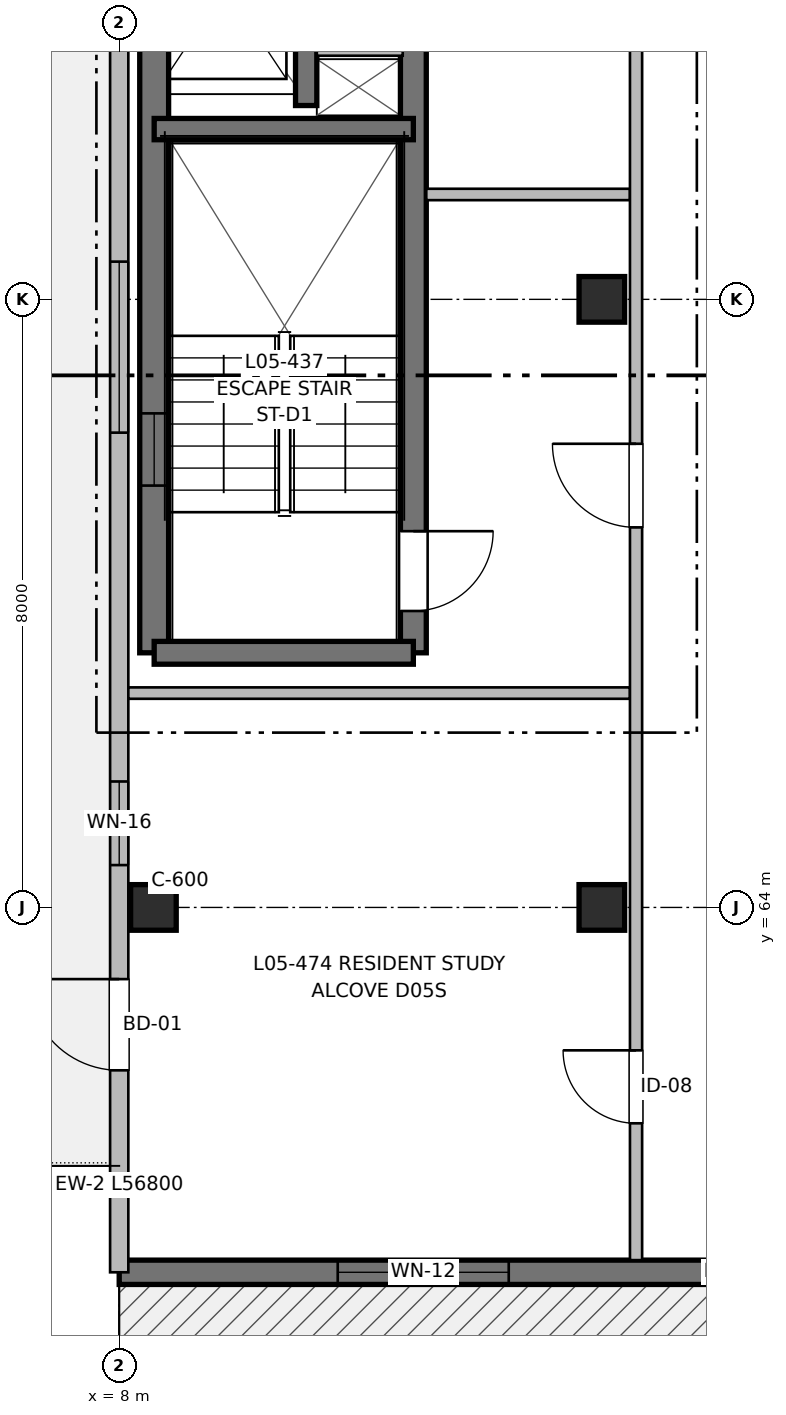
"""IFC4 building model, lengths in metres.
Left out: names, types, materials, properties, quantities, classifications, styles, units other than length and angle.
Written with IfcOpenShell. Run it as: python <this file> out.ifc"""

import sys

from ifc_helpers import new_model, si_unit, direction, frame, frame_2d, origin, origin_2d, place, context, subcontext, project, spatial, rectangle, extrude, element, fill, save


model = new_model("IFC4")
c1 = context("Model", 3, precision=1e-05, world=origin(), true_north=direction((0.0, 1.0)))
c2 = subcontext(c1, "Body", "Model", "MODEL_VIEW")
j1 = project(units=[si_unit("LENGTHUNIT", "METRE"), si_unit("PLANEANGLEUNIT", "RADIAN")], contexts=[c1])
p1 = place(None, origin())
s1 = spatial("IfcSite", under=j1, at=p1, CompositionType="ELEMENT")
p2 = place(p1, origin())
s2 = spatial("IfcBuilding", under=s1, at=p2, CompositionType="ELEMENT")
p3 = place(p2, frame((0.0, 0.0, 16.96)))
s3 = spatial("IfcBuildingStorey", under=s2, at=p3, CompositionType="ELEMENT", Elevation=16.96)
for number, where, z_axis, x_axis in (
    (1, (8.45, 64.0, 0.0), (0.0, 0.0, 1.0), (1.0, 0.0, 0.0)),
    (2, (14.35, 64.0, 0.0), (0.0, 0.0, 1.0), (1.0, 0.0, 0.0)),
    (3, (14.35, 72.0, 0.0), (0.0, 0.0, 1.0), (1.0, 0.0, 0.0)),
):
    element("IfcColumn", number, at=place(p3, frame(where, z_axis=z_axis, x_axis=x_axis)), inside=s3, PredefinedType="COLUMN", context=c2, shape_type="SweptSolid", body=[
        extrude(rectangle(XDim=0.6, YDim=0.6, at=origin_2d()), origin(), (0.0, 0.0, 1.0), 3.2),
    ])
p4 = place(p3, frame((8.46, 67.35, 0.0), z_axis=(0.0, 0.0, 1.0), x_axis=(0.0, 1.0, 0.0)))
e4 = element("IfcWall", 4, at=p4, inside=s3, PredefinedType="SHEAR", context=c2, shape_type="SweptSolid", body=[
    extrude(rectangle(XDim=12.45, YDim=0.38, at=frame_2d((6.225, 0.0))), origin(), (0.0, 0.0, 1.0), 3.2),
])
p5 = place(p4, frame((2.2, 0.0, 0.97)))
e5 = element("IfcOpeningElement", 5, at=p5, cuts=e4, PredefinedType="OPENING", context=c2, shape_type="SweptSolid", body=[
    extrude(rectangle(XDim=0.95, YDim=1.25, at=frame_2d((0.475, 0.625))), frame((0.0, 0.2, 0.0), z_axis=(0.0, -1.0, 0.0), x_axis=(1.0, 0.0, 0.0)), (0.0, 0.0, 1.0), 0.4),
])
p6 = place(p3, frame((11.87, 79.8, 0.0), z_axis=(0.0, 0.0, 1.0), x_axis=(0.0, -1.0, 0.0)))
e6 = element("IfcWall", 6, at=p6, inside=s3, PredefinedType="SHEAR", context=c2, shape_type="SweptSolid", body=[
    extrude(rectangle(XDim=12.45, YDim=0.34, at=frame_2d((6.225, 0.0))), origin(), (0.0, 0.0, 1.0), 3.2),
])
p7 = place(p6, frame((10.85, 0.0, 0.0)))
e7 = element("IfcOpeningElement", 7, at=p7, cuts=e6, PredefinedType="OPENING", context=c2, shape_type="SweptSolid", body=[
    extrude(rectangle(XDim=1.05, YDim=2.15, at=frame_2d((0.525, 1.075))), frame((0.0, 0.18, 0.0), z_axis=(0.0, -1.0, 0.0), x_axis=(1.0, 0.0, 0.0)), (0.0, 0.0, 1.0), 0.36),
])
p8 = place(p3, frame((11.87, 67.35, 0.0), z_axis=(0.0, 0.0, 1.0), x_axis=(-1.0, 0.0, 0.0)))
e8 = element("IfcWall", 8, at=p8, inside=s3, PredefinedType="SHEAR", context=c2, shape_type="SweptSolid", body=[
    extrude(rectangle(XDim=3.41, YDim=0.3, at=frame_2d((1.705, 0.0))), origin(), (0.0, 0.0, 1.0), 3.2),
])
p9 = place(p3, frame((8.46, 74.24, 0.0), z_axis=(0.0, 0.0, 1.0), x_axis=(1.0, 0.0, 0.0)))
e9 = element("IfcWall", 9, at=p9, inside=s3, PredefinedType="SHEAR", context=c2, shape_type="SweptSolid", body=[
    extrude(rectangle(XDim=3.41, YDim=0.28, at=frame_2d((1.705, 0.0))), origin(), (0.0, 0.0, 1.0), 3.2),
])
p10 = place(p3, frame((10.46, 74.55, 0.0), z_axis=(0.0, 0.0, 1.0), x_axis=(0.0, 1.0, 0.0)))
e10 = element("IfcWall", 10, at=p10, inside=s3, PredefinedType="SHEAR", context=c2, shape_type="SweptSolid", body=[
    extrude(rectangle(XDim=5.25, YDim=0.28, at=frame_2d((2.625, 0.0))), origin(), (0.0, 0.0, 1.0), 3.2),
])
p11 = place(p10, frame((1.15, 0.0, 0.0)))
e11 = element("IfcOpeningElement", 11, at=p11, cuts=e10, PredefinedType="OPENING", context=c2, shape_type="SweptSolid", body=[
    extrude(rectangle(XDim=1.0, YDim=2.15, at=frame_2d((0.5, 1.075))), frame((0.0, 0.15, 0.0), z_axis=(0.0, -1.0, 0.0), x_axis=(1.0, 0.0, 0.0)), (0.0, 0.0, 1.0), 0.3),
])
p12 = place(p10, frame((3.85, 0.0, 0.0)))
e12 = element("IfcOpeningElement", 12, at=p12, cuts=e10, PredefinedType="OPENING", context=c2, shape_type="SweptSolid", body=[
    extrude(rectangle(XDim=0.9, YDim=2.15, at=frame_2d((0.45, 1.075))), frame((0.0, 0.15, 0.0), z_axis=(0.0, -1.0, 0.0), x_axis=(1.0, 0.0, 0.0)), (0.0, 0.0, 1.0), 0.3),
])
p13 = place(p3, frame((10.6, 75.28, 0.0), z_axis=(0.0, 0.0, 1.0), x_axis=(1.0, 0.0, 0.0)))
e13 = element("IfcWall", 13, at=p13, inside=s3, PredefinedType="PARTITIONING", context=c2, shape_type="SweptSolid", body=[
    extrude(rectangle(XDim=1.13, YDim=0.15, at=frame_2d((0.565, 0.0))), origin(), (0.0, 0.0, 1.0), 2.95),
])
p14 = place(p3, frame((24.0, 59.2, 0.0), z_axis=(0.0, 0.0, 1.0), x_axis=(-1.0, 0.0, 0.0)))
e14 = element("IfcWall", 14, at=p14, inside=s3, PredefinedType="SHEAR", context=c2, shape_type="SweptSolid", body=[
    extrude(rectangle(XDim=16.0, YDim=0.32, at=frame_2d((8.0, 0.0))), origin(), (0.0, 0.0, 1.0), 2.98),
])
p15 = place(p14, frame((2.55, 0.0, 0.0)))
e15 = element("IfcOpeningElement", 15, at=p15, cuts=e14, PredefinedType="OPENING", context=c2, shape_type="SweptSolid", body=[
    extrude(rectangle(XDim=1.35, YDim=2.2, at=frame_2d((0.675, 1.1))), frame((0.0, 0.17, 0.0), z_axis=(0.0, -1.0, 0.0), x_axis=(1.0, 0.0, 0.0)), (0.0, 0.0, 1.0), 0.34),
])
p16 = place(p14, frame((10.875, 0.0, 0.72)))
e16 = element("IfcOpeningElement", 16, at=p16, cuts=e14, PredefinedType="OPENING", context=c2, shape_type="SweptSolid", body=[
    extrude(rectangle(XDim=2.25, YDim=1.5, at=frame_2d((1.125, 0.75))), frame((0.0, 0.17, 0.0), z_axis=(0.0, -1.0, 0.0), x_axis=(1.0, 0.0, 0.0)), (0.0, 0.0, 1.0), 0.34),
])
p17 = place(p3, frame((8.0, 59.2, 0.0), z_axis=(0.0, 0.0, 1.0), x_axis=(0.0, 1.0, 0.0)))
e17 = element("IfcWall", 17, at=p17, inside=s3, PredefinedType="SOLIDWALL", context=c2, shape_type="SweptSolid", body=[
    extrude(rectangle(XDim=56.8, YDim=0.24, at=frame_2d((28.4, 0.0))), origin(), (0.0, 0.0, 1.0), 2.98),
])
p18 = place(p17, frame((2.657, 0.0, 0.0)))
e18 = element("IfcOpeningElement", 18, at=p18, cuts=e17, PredefinedType="OPENING", context=c2, shape_type="SweptSolid", body=[
    extrude(rectangle(XDim=1.2, YDim=2.2, at=frame_2d((0.6, 1.1))), frame((0.0, 0.13, 0.0), z_axis=(0.0, -1.0, 0.0), x_axis=(1.0, 0.0, 0.0)), (0.0, 0.0, 1.0), 0.26),
])
p19 = place(p17, frame((5.357, 0.0, 0.62)))
e19 = element("IfcOpeningElement", 19, at=p19, cuts=e17, PredefinedType="OPENING", context=c2, shape_type="SweptSolid", body=[
    extrude(rectangle(XDim=1.1, YDim=1.6, at=frame_2d((0.55, 0.8))), frame((0.0, 0.13, 0.0), z_axis=(0.0, -1.0, 0.0), x_axis=(1.0, 0.0, 0.0)), (0.0, 0.0, 1.0), 0.26),
])
p20 = place(p17, frame((11.046, 0.0, 0.72)))
e20 = element("IfcOpeningElement", 20, at=p20, cuts=e17, PredefinedType="OPENING", context=c2, shape_type="SweptSolid", body=[
    extrude(rectangle(XDim=2.25, YDim=1.5, at=frame_2d((1.125, 0.75))), frame((0.0, 0.13, 0.0), z_axis=(0.0, -1.0, 0.0), x_axis=(1.0, 0.0, 0.0)), (0.0, 0.0, 1.0), 0.26),
])
p21 = place(p17, frame((19.311, 0.0, 0.9)))
e21 = element("IfcOpeningElement", 21, at=p21, cuts=e17, PredefinedType="OPENING", context=c2, shape_type="SweptSolid", body=[
    extrude(rectangle(XDim=1.05, YDim=1.15, at=frame_2d((0.525, 0.575))), frame((0.0, 0.13, 0.0), z_axis=(0.0, -1.0, 0.0), x_axis=(1.0, 0.0, 0.0)), (0.0, 0.0, 1.0), 0.26),
])
p22 = place(p17, frame((27.8, 0.0, 0.9)))
e22 = element("IfcOpeningElement", 22, at=p22, cuts=e17, PredefinedType="OPENING", context=c2, shape_type="SweptSolid", body=[
    extrude(rectangle(XDim=1.2, YDim=1.05, at=frame_2d((0.6, 0.525))), frame((0.0, 0.13, 0.0), z_axis=(0.0, -1.0, 0.0), x_axis=(1.0, 0.0, 0.0)), (0.0, 0.0, 1.0), 0.26),
])
p23 = place(p17, frame((36.189, 0.0, 0.9)))
e23 = element("IfcOpeningElement", 23, at=p23, cuts=e17, PredefinedType="OPENING", context=c2, shape_type="SweptSolid", body=[
    extrude(rectangle(XDim=0.65, YDim=0.95, at=frame_2d((0.325, 0.475))), frame((0.0, 0.13, 0.0), z_axis=(0.0, -1.0, 0.0), x_axis=(1.0, 0.0, 0.0)), (0.0, 0.0, 1.0), 0.26),
])
p24 = place(p17, frame((43.629, 0.0, 0.62)))
e24 = element("IfcOpeningElement", 24, at=p24, cuts=e17, PredefinedType="OPENING", context=c2, shape_type="SweptSolid", body=[
    extrude(rectangle(XDim=1.1, YDim=1.6, at=frame_2d((0.55, 0.8))), frame((0.0, 0.13, 0.0), z_axis=(0.0, -1.0, 0.0), x_axis=(1.0, 0.0, 0.0)), (0.0, 0.0, 1.0), 0.26),
])
p25 = place(p17, frame((52.693, 0.0, 0.47)))
e25 = element("IfcOpeningElement", 25, at=p25, cuts=e17, PredefinedType="OPENING", context=c2, shape_type="SweptSolid", body=[
    extrude(rectangle(XDim=2.7, YDim=1.75, at=frame_2d((1.35, 0.875))), frame((0.0, 0.13, 0.0), z_axis=(0.0, -1.0, 0.0), x_axis=(1.0, 0.0, 0.0)), (0.0, 0.0, 1.0), 0.26),
])
p26 = place(p3, frame((8.12, 66.82, 0.0), z_axis=(0.0, 0.0, 1.0), x_axis=(1.0, 0.0, 0.0)))
e26 = element("IfcWall", 26, at=p26, inside=s3, PredefinedType="PARTITIONING", context=c2, shape_type="SweptSolid", body=[
    extrude(rectangle(XDim=6.6, YDim=0.15, at=frame_2d((3.3, 0.0))), origin(), (0.0, 0.0, 1.0), 2.935),
])
p27 = place(p3, frame((12.04, 73.38, 0.0), z_axis=(0.0, 0.0, 1.0), x_axis=(1.0, 0.0, 0.0)))
e27 = element("IfcWall", 27, at=p27, inside=s3, PredefinedType="PARTITIONING", context=c2, shape_type="SweptSolid", body=[
    extrude(rectangle(XDim=2.68, YDim=0.15, at=frame_2d((1.34, 0.0))), origin(), (0.0, 0.0, 1.0), 2.935),
])
p28 = place(p3, frame((14.8, 59.36, 0.0), z_axis=(0.0, 0.0, 1.0), x_axis=(0.0, 1.0, 0.0)))
e28 = element("IfcWall", 28, at=p28, inside=s3, PredefinedType="PARTITIONING", context=c2, shape_type="SweptSolid", body=[
    extrude(rectangle(XDim=47.44, YDim=0.16, at=frame_2d((23.72, 0.0))), origin(), (0.0, 0.0, 1.0), 2.935),
])
p29 = place(p28, frame((9.64, 0.0, 0.0)))
e29 = element("IfcOpeningElement", 29, at=p29, cuts=e28, PredefinedType="OPENING", context=c2, shape_type="SweptSolid", body=[
    extrude(rectangle(XDim=1.1, YDim=2.15, at=frame_2d((0.55, 1.075))), frame((0.0, 0.09, 0.0), z_axis=(0.0, -1.0, 0.0), x_axis=(1.0, 0.0, 0.0)), (0.0, 0.0, 1.0), 0.18),
])
p30 = place(p28, frame((16.04, 0.0, 0.0)))
e30 = element("IfcOpeningElement", 30, at=p30, cuts=e28, PredefinedType="OPENING", context=c2, shape_type="SweptSolid", body=[
    extrude(rectangle(XDim=1.6, YDim=2.15, at=frame_2d((0.8, 1.075))), frame((0.0, 0.09, 0.0), z_axis=(0.0, -1.0, 0.0), x_axis=(1.0, 0.0, 0.0)), (0.0, 0.0, 1.0), 0.18),
])
p31 = place(p28, frame((1.8, 0.0, 0.0)))
e31 = element("IfcOpeningElement", 31, at=p31, cuts=e28, PredefinedType="OPENING", context=c2, shape_type="SweptSolid", body=[
    extrude(rectangle(XDim=0.96, YDim=2.15, at=frame_2d((0.48, 1.075))), frame((0.0, 0.09, 0.0), z_axis=(0.0, -1.0, 0.0), x_axis=(1.0, 0.0, 0.0)), (0.0, 0.0, 1.0), 0.18),
])
p32 = place(p28, frame((29.445, 0.0, 0.0)))
e32 = element("IfcOpeningElement", 32, at=p32, cuts=e28, PredefinedType="OPENING", context=c2, shape_type="SweptSolid", body=[
    extrude(rectangle(XDim=0.98, YDim=2.15, at=frame_2d((0.49, 1.075))), frame((0.0, 0.09, 0.0), z_axis=(0.0, -1.0, 0.0), x_axis=(1.0, 0.0, 0.0)), (0.0, 0.0, 1.0), 0.18),
])
p33 = place(p28, frame((38.055, 0.0, 0.0)))
e33 = element("IfcOpeningElement", 33, at=p33, cuts=e28, PredefinedType="OPENING", context=c2, shape_type="SweptSolid", body=[
    extrude(rectangle(XDim=0.98, YDim=2.15, at=frame_2d((0.49, 1.075))), frame((0.0, 0.09, 0.0), z_axis=(0.0, -1.0, 0.0), x_axis=(1.0, 0.0, 0.0)), (0.0, 0.0, 1.0), 0.18),
])
p34 = place(p7, origin())
e34 = element("IfcDoor", 34, at=p34, inside=s3, OperationType="SINGLE_SWING_LEFT", PredefinedType="DOOR", context=c2, shape_type="SweptSolid", body=[
    extrude(rectangle(XDim=1.05, YDim=2.15, at=frame_2d((0.525, 1.075))), frame((0.0, 0.025, 0.0), z_axis=(0.0, -1.0, 0.0), x_axis=(1.0, 0.0, 0.0)), (0.0, 0.0, 1.0), 0.05),
])
fill(e7, e34)
p35 = place(p5, origin())
e35 = element("IfcWindow", 35, at=p35, inside=s3, PartitioningType="SINGLE_PANEL", PredefinedType="WINDOW", context=c2, shape_type="SweptSolid", body=[
    extrude(rectangle(XDim=0.95, YDim=1.25, at=frame_2d((0.475, 0.625))), frame((0.0, 0.03, 0.0), z_axis=(0.0, -1.0, 0.0), x_axis=(1.0, 0.0, 0.0)), (0.0, 0.0, 1.0), 0.06),
])
fill(e5, e35)
p36 = place(p16, origin())
e36 = element("IfcWindow", 36, at=p36, inside=s3, PartitioningType="SINGLE_PANEL", PredefinedType="WINDOW", context=c2, shape_type="SweptSolid", body=[
    extrude(rectangle(XDim=2.25, YDim=1.5, at=frame_2d((1.125, 0.75))), frame((0.0, 0.03, 0.0), z_axis=(0.0, -1.0, 0.0), x_axis=(1.0, 0.0, 0.0)), (0.0, 0.0, 1.0), 0.06),
])
fill(e16, e36)
p37 = place(p18, origin())
e37 = element("IfcDoor", 37, at=p37, inside=s3, OperationType="SINGLE_SWING_RIGHT", PredefinedType="DOOR", context=c2, shape_type="SweptSolid", body=[
    extrude(rectangle(XDim=1.2, YDim=2.2, at=frame_2d((0.6, 1.1))), frame((0.0, 0.025, 0.0), z_axis=(0.0, -1.0, 0.0), x_axis=(1.0, 0.0, 0.0)), (0.0, 0.0, 1.0), 0.05),
])
fill(e18, e37)
p38 = place(p19, origin())
e38 = element("IfcWindow", 38, at=p38, inside=s3, PartitioningType="SINGLE_PANEL", PredefinedType="WINDOW", context=c2, shape_type="SweptSolid", body=[
    extrude(rectangle(XDim=1.1, YDim=1.6, at=frame_2d((0.55, 0.8))), frame((0.0, 0.03, 0.0), z_axis=(0.0, -1.0, 0.0), x_axis=(1.0, 0.0, 0.0)), (0.0, 0.0, 1.0), 0.06),
])
fill(e19, e38)
p39 = place(p20, origin())
e39 = element("IfcWindow", 39, at=p39, inside=s3, PartitioningType="SINGLE_PANEL", PredefinedType="WINDOW", context=c2, shape_type="SweptSolid", body=[
    extrude(rectangle(XDim=2.25, YDim=1.5, at=frame_2d((1.125, 0.75))), frame((0.0, 0.03, 0.0), z_axis=(0.0, -1.0, 0.0), x_axis=(1.0, 0.0, 0.0)), (0.0, 0.0, 1.0), 0.06),
])
fill(e20, e39)
p40 = place(p29, origin())
e40 = element("IfcDoor", 40, at=p40, inside=s3, OperationType="SINGLE_SWING_RIGHT", PredefinedType="DOOR", context=c2, shape_type="SweptSolid", body=[
    extrude(rectangle(XDim=1.1, YDim=2.15, at=frame_2d((0.55, 1.075))), frame((0.0, 0.025, 0.0), z_axis=(0.0, -1.0, 0.0), x_axis=(1.0, 0.0, 0.0)), (0.0, 0.0, 1.0), 0.05),
])
fill(e29, e40)
p41 = place(p31, origin())
e41 = element("IfcDoor", 41, at=p41, inside=s3, OperationType="SINGLE_SWING_RIGHT", PredefinedType="DOOR", context=c2, shape_type="SweptSolid", body=[
    extrude(rectangle(XDim=0.96, YDim=2.15, at=frame_2d((0.48, 1.075))), frame((0.0, 0.025, 0.0), z_axis=(0.0, -1.0, 0.0), x_axis=(1.0, 0.0, 0.0)), (0.0, 0.0, 1.0), 0.05),
])
fill(e31, e41)
save(model, sys.argv[1])
